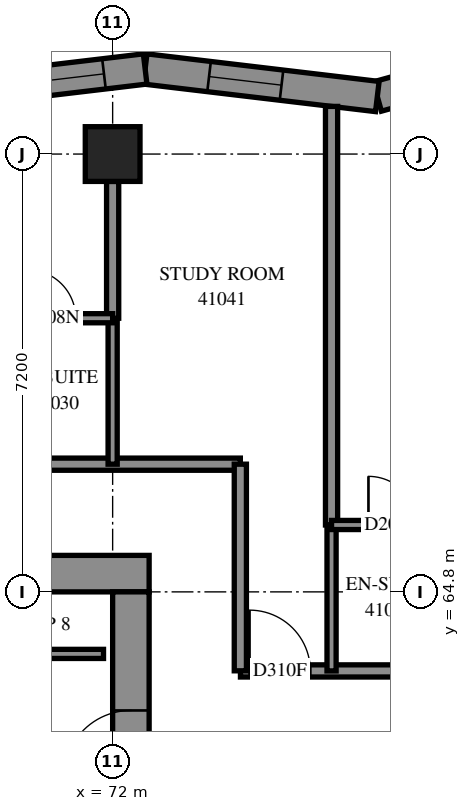
"""IFC4 building model, lengths in metres.
Left out: names, types, materials, properties, quantities, classifications, styles, units other than length and angle.
Written with IfcOpenShell. Run it as: python <this file> out.ifc"""

import sys

from ifc_helpers import new_model, si_unit, direction, frame, frame_2d, origin, origin_2d, place, context, subcontext, project, spatial, polyline, rectangle, outline, extrude, element, fill, save


model = new_model("IFC4")
c1 = context("Model", 3, precision=1e-05, world=origin(), true_north=direction((0.0, 1.0)))
c2 = subcontext(c1, "Body", "Model", "MODEL_VIEW")
j1 = project(units=[si_unit("LENGTHUNIT", "METRE"), si_unit("PLANEANGLEUNIT", "RADIAN")], contexts=[c1])
p1 = place(None, origin())
s1 = spatial("IfcSite", under=j1, at=p1, CompositionType="ELEMENT")
p2 = place(p1, origin())
s2 = spatial("IfcBuilding", under=s1, at=p2, CompositionType="ELEMENT")
p3 = place(p2, frame((0.0, 0.0, 152.4)))
s3 = spatial("IfcBuildingStorey", under=s2, at=p3, CompositionType="ELEMENT", Elevation=152.4)
p4 = place(p3, frame((72.0, 72.0, 0.0), z_axis=(0.0, 0.0, 1.0), x_axis=(1.0, 0.0, 0.0)))
e1 = element("IfcColumn", 1, at=p4, inside=s3, PredefinedType="COLUMN", context=c2, shape_type="SweptSolid", body=[
    extrude(rectangle(XDim=0.9, YDim=0.9, at=origin_2d()), origin(), (0.0, 0.0, 1.0), 3.1),
])
p5 = place(p3, frame((57.0, 65.1, -0.3), z_axis=(0.0, 0.0, 1.0), x_axis=(1.0, 0.0, 0.0)))
e2 = element("IfcWall", 2, at=p5, inside=s3, PredefinedType="SHEAR", context=c2, shape_type="SweptSolid", body=[
    extrude(rectangle(XDim=15.6, YDim=0.6, at=frame_2d((7.8, 0.0))), origin(), (0.0, 0.0, 1.0), 2.7),
])
p6 = place(p5, frame((10.6, 0.0, 0.3)))
e3 = element("IfcOpeningElement", 3, at=p6, cuts=e2, PredefinedType="OPENING", context=c2, shape_type="SweptSolid", body=[
    extrude(rectangle(XDim=0.8, YDim=2.1, at=frame_2d((0.4, 1.05))), frame((0.0, 0.31, 0.0), z_axis=(0.0, -1.0, 0.0), x_axis=(1.0, 0.0, 0.0)), (0.0, 0.0, 1.0), 0.62),
])
p7 = place(p3, frame((72.3, 50.4, -0.3), z_axis=(0.0, 0.0, 1.0), x_axis=(0.0, 1.0, 0.0)))
e4 = element("IfcWall", 4, at=p7, inside=s3, PredefinedType="SHEAR", context=c2, shape_type="SweptSolid", body=[
    extrude(rectangle(XDim=14.4, YDim=0.6, at=frame_2d((7.2, 0.0))), origin(), (0.0, 0.0, 1.0), 2.7),
])
p8 = place(p7, frame((4.55, 0.0, 0.3)))
e5 = element("IfcOpeningElement", 5, at=p8, cuts=e4, PredefinedType="OPENING", context=c2, shape_type="SweptSolid", body=[
    extrude(rectangle(XDim=1.1, YDim=2.1, at=frame_2d((0.55, 1.05))), frame((0.0, 0.31, 0.0), z_axis=(0.0, -1.0, 0.0), x_axis=(1.0, 0.0, 0.0)), (0.0, 0.0, 1.0), 0.62),
])
p9 = place(p7, frame((11.35, 0.0, 0.3)))
e6 = element("IfcOpeningElement", 6, at=p9, cuts=e4, PredefinedType="OPENING", context=c2, shape_type="SweptSolid", body=[
    extrude(rectangle(XDim=1.1, YDim=2.1, at=frame_2d((0.55, 1.05))), frame((0.0, 0.31, 0.0), z_axis=(0.0, -1.0, 0.0), x_axis=(1.0, 0.0, 0.0)), (0.0, 0.0, 1.0), 0.62),
])
p10 = place(p3, frame((80.005, 73.956, 0.0), z_axis=(0.0, 0.0, 1.0), x_axis=(-0.9638013092, -0.2666215226, 0.0)))
e7 = element("IfcWall", 7, at=p10, inside=s3, PredefinedType="SOLIDWALL", context=c2, shape_type="SweptSolid", body=[
    extrude(outline(polyline([(-0.202, -0.25), (3.74, -0.25), (3.838, 0.25), (0.202, 0.25), (-0.202, -0.25)])), origin(), (0.0, 0.0, 1.0), 3.1),
])
p11 = place(p10, frame((1.612, 0.0, 0.45)))
e8 = element("IfcOpeningElement", 8, at=p11, cuts=e7, PredefinedType="OPENING", context=c2, shape_type="SweptSolid", body=[
    extrude(rectangle(XDim=1.2, YDim=2.5, at=frame_2d((0.6, 1.25))), frame((0.0, 0.26, 0.0), z_axis=(0.0, -1.0, 0.0), x_axis=(1.0, 0.0, 0.0)), (0.0, 0.0, 1.0), 0.52),
])
p12 = place(p3, frame((76.353, 72.946, 0.0), z_axis=(0.0, 0.0, 1.0), x_axis=(-0.9930297168, 0.1178642505, 0.0)))
e9 = element("IfcWall", 9, at=p12, inside=s3, PredefinedType="SOLIDWALL", context=c2, shape_type="SweptSolid", body=[
    extrude(outline(polyline([(0.049, -0.25), (3.875, -0.25), (3.815, 0.25), (-0.049, 0.25), (0.049, -0.25)])), origin(), (0.0, 0.0, 1.0), 3.1),
])
p13 = place(p12, frame((1.587, 0.0, 0.45)))
e10 = element("IfcOpeningElement", 10, at=p13, cuts=e9, PredefinedType="OPENING", context=c2, shape_type="SweptSolid", body=[
    extrude(rectangle(XDim=1.2, YDim=2.5, at=frame_2d((0.6, 1.25))), frame((0.0, 0.26, 0.0), z_axis=(0.0, -1.0, 0.0), x_axis=(1.0, 0.0, 0.0)), (0.0, 0.0, 1.0), 0.52),
])
p14 = place(p3, frame((72.534, 73.399, 0.0), z_axis=(0.0, 0.0, 1.0), x_axis=(-0.9930269402, -0.1178876415, 0.0)))
e11 = element("IfcWall", 11, at=p14, inside=s3, PredefinedType="SOLIDWALL", context=c2, shape_type="SweptSolid", body=[
    extrude(outline(polyline([(-0.03, -0.25), (3.796, -0.25), (3.855, 0.25), (0.03, 0.25), (-0.03, -0.25)])), origin(), (0.0, 0.0, 1.0), 3.1),
])
p15 = place(p14, frame((0.682, 0.0, 0.45)))
e12 = element("IfcOpeningElement", 12, at=p15, cuts=e11, PredefinedType="OPENING", context=c2, shape_type="SweptSolid", body=[
    extrude(rectangle(XDim=2.8, YDim=2.5, at=frame_2d((1.4, 1.25))), frame((0.0, 0.26, 0.0), z_axis=(0.0, -1.0, 0.0), x_axis=(1.0, 0.0, 0.0)), (0.0, 0.0, 1.0), 0.52),
])
p16 = place(p3, frame((64.95, 63.78, 0.0), z_axis=(0.0, 0.0, 1.0), x_axis=(1.0, 0.0, 0.0)))
e13 = element("IfcWall", 13, at=p16, inside=s3, PredefinedType="PARTITIONING", context=c2, shape_type="SweptSolid", body=[
    extrude(rectangle(XDim=6.9, YDim=0.15, at=frame_2d((3.45, 0.0))), origin(), (0.0, 0.0, 1.0), 3.1),
])
p17 = place(p3, frame((55.5, 66.9, 0.0), z_axis=(0.0, 0.0, 1.0), x_axis=(1.0, 0.0, 0.0)))
e14 = element("IfcWall", 14, at=p17, inside=s3, PredefinedType="PARTITIONING", context=c2, shape_type="SweptSolid", body=[
    extrude(rectangle(XDim=18.6, YDim=0.2, at=frame_2d((9.3, 0.0))), origin(), (0.0, 0.0, 1.0), 3.1),
])
p18 = place(p17, frame((4.4, 0.0, 0.0)))
e15 = element("IfcOpeningElement", 15, at=p18, cuts=e14, PredefinedType="OPENING", context=c2, shape_type="SweptSolid", body=[
    extrude(rectangle(XDim=0.9, YDim=2.1, at=frame_2d((0.45, 1.05))), frame((0.0, 0.11, 0.0), z_axis=(0.0, -1.0, 0.0), x_axis=(1.0, 0.0, 0.0)), (0.0, 0.0, 1.0), 0.22),
])
p19 = place(p17, frame((6.1, 0.0, 0.0)))
e16 = element("IfcOpeningElement", 16, at=p19, cuts=e14, PredefinedType="OPENING", context=c2, shape_type="SweptSolid", body=[
    extrude(rectangle(XDim=0.9, YDim=2.1, at=frame_2d((0.45, 1.05))), frame((0.0, 0.11, 0.0), z_axis=(0.0, -1.0, 0.0), x_axis=(1.0, 0.0, 0.0)), (0.0, 0.0, 1.0), 0.22),
])
p20 = place(p17, frame((11.65, 0.0, 0.0)))
e17 = element("IfcOpeningElement", 17, at=p20, cuts=e14, PredefinedType="OPENING", context=c2, shape_type="SweptSolid", body=[
    extrude(rectangle(XDim=0.9, YDim=2.1, at=frame_2d((0.45, 1.05))), frame((0.0, 0.11, 0.0), z_axis=(0.0, -1.0, 0.0), x_axis=(1.0, 0.0, 0.0)), (0.0, 0.0, 1.0), 0.22),
])
p21 = place(p17, frame((13.3, 0.0, 0.0)))
e18 = element("IfcOpeningElement", 18, at=p21, cuts=e14, PredefinedType="OPENING", context=c2, shape_type="SweptSolid", body=[
    extrude(rectangle(XDim=0.9, YDim=2.1, at=frame_2d((0.45, 1.05))), frame((0.0, 0.11, 0.0), z_axis=(0.0, -1.0, 0.0), x_axis=(1.0, 0.0, 0.0)), (0.0, 0.0, 1.0), 0.22),
])
p22 = place(p3, frame((75.6, 65.9, 0.0), z_axis=(0.0, 0.0, 1.0), x_axis=(0.0, 1.0, 0.0)))
e19 = element("IfcWall", 19, at=p22, inside=s3, PredefinedType="PARTITIONING", context=c2, shape_type="SweptSolid", body=[
    extrude(rectangle(XDim=6.884, YDim=0.2, at=frame_2d((3.442, 0.0))), origin(), (0.0, 0.0, 1.0), 3.1),
])
p23 = place(p3, frame((74.102, 63.5, 0.0), z_axis=(0.0, 0.0, 1.0), x_axis=(1.0, 0.0, 0.0)))
e20 = element("IfcWall", 20, at=p23, inside=s3, PredefinedType="PARTITIONING", context=c2, shape_type="SweptSolid", body=[
    extrude(rectangle(XDim=5.098, YDim=0.2, at=frame_2d((2.549, 0.0))), origin(), (0.0, 0.0, 1.0), 3.1),
])
p24 = place(p23, frame((0.149, 0.0, 0.0)))
e21 = element("IfcOpeningElement", 21, at=p24, cuts=e20, PredefinedType="OPENING", context=c2, shape_type="SweptSolid", body=[
    extrude(rectangle(XDim=1.0, YDim=2.1, at=frame_2d((0.5, 1.05))), frame((0.0, 0.11, 0.0), z_axis=(0.0, -1.0, 0.0), x_axis=(1.0, 0.0, 0.0)), (0.0, 0.0, 1.0), 0.22),
])
p25 = place(p23, frame((3.688, 0.0, 0.0)))
e22 = element("IfcOpeningElement", 22, at=p25, cuts=e20, PredefinedType="OPENING", context=c2, shape_type="SweptSolid", body=[
    extrude(rectangle(XDim=0.9, YDim=2.1, at=frame_2d((0.45, 1.05))), frame((0.0, 0.11, 0.0), z_axis=(0.0, -1.0, 0.0), x_axis=(1.0, 0.0, 0.0)), (0.0, 0.0, 1.0), 0.22),
])
p26 = place(p3, frame((74.1, 63.502, 0.0), z_axis=(0.0, 0.0, 1.0), x_axis=(0.0, 1.0, 0.0)))
e23 = element("IfcWall", 23, at=p26, inside=s3, PredefinedType="PARTITIONING", context=c2, shape_type="SweptSolid", body=[
    extrude(rectangle(XDim=3.398, YDim=0.2, at=frame_2d((1.699, 0.0))), origin(), (0.0, 0.0, 1.0), 3.1),
])
for number, where, z_axis, x_axis in (
    (24, (75.6, 63.5, 0.0), (0.0, 0.0, 1.0), (0.0, 1.0, 0.0)),
    (25, (72.0, 66.9, 0.0), (0.0, 0.0, 1.0), (0.0, 1.0, 0.0)),
):
    element("IfcWall", number, at=place(p3, frame(where, z_axis=z_axis, x_axis=x_axis)), inside=s3, PredefinedType="PARTITIONING", context=c2, shape_type="SweptSolid", body=[
        extrude(rectangle(XDim=2.4, YDim=0.15, at=frame_2d((1.2, 0.0))), origin(), (0.0, 0.0, 1.0), 3.1),
    ])
p27 = place(p3, frame((72.0, 69.3, 0.0), z_axis=(0.0, 0.0, 1.0), x_axis=(0.0, 1.0, 0.0)))
e26 = element("IfcWall", 26, at=p27, inside=s3, PredefinedType="PARTITIONING", context=c2, shape_type="SweptSolid", body=[
    extrude(rectangle(XDim=2.25, YDim=0.2, at=frame_2d((1.125, 0.0))), origin(), (0.0, 0.0, 1.0), 3.1),
])
p28 = place(p3, frame((75.6, 65.9, 0.0), z_axis=(0.0, 0.0, 1.0), x_axis=(1.0, 0.0, 0.0)))
e27 = element("IfcWall", 27, at=p28, inside=s3, PredefinedType="PARTITIONING", context=c2, shape_type="SweptSolid", body=[
    extrude(rectangle(XDim=1.9, YDim=0.15, at=frame_2d((0.95, 0.0))), origin(), (0.0, 0.0, 1.0), 3.1),
])
p29 = place(p28, frame((0.607, 0.0, 0.0)))
e28 = element("IfcOpeningElement", 28, at=p29, cuts=e27, PredefinedType="OPENING", context=c2, shape_type="SweptSolid", body=[
    extrude(rectangle(XDim=0.8, YDim=2.1, at=frame_2d((0.4, 1.05))), frame((0.0, 0.085, 0.0), z_axis=(0.0, -1.0, 0.0), x_axis=(1.0, 0.0, 0.0)), (0.0, 0.0, 1.0), 0.17),
])
p30 = place(p3, frame((70.1, 69.3, 0.0), z_axis=(0.0, 0.0, 1.0), x_axis=(1.0, 0.0, 0.0)))
e29 = element("IfcWall", 29, at=p30, inside=s3, PredefinedType="PARTITIONING", context=c2, shape_type="SweptSolid", body=[
    extrude(rectangle(XDim=1.9, YDim=0.15, at=frame_2d((0.95, 0.0))), origin(), (0.0, 0.0, 1.0), 3.1),
])
p31 = place(p30, frame((0.493, 0.0, 0.0)))
e30 = element("IfcOpeningElement", 30, at=p31, cuts=e29, PredefinedType="OPENING", context=c2, shape_type="SweptSolid", body=[
    extrude(rectangle(XDim=0.8, YDim=2.1, at=frame_2d((0.4, 1.05))), frame((0.0, 0.085, 0.0), z_axis=(0.0, -1.0, 0.0), x_axis=(1.0, 0.0, 0.0)), (0.0, 0.0, 1.0), 0.17),
])
p32 = place(p13, origin())
e31 = element("IfcWindow", 31, at=p32, inside=s3, PartitioningType="SINGLE_PANEL", PredefinedType="WINDOW", context=c2, shape_type="SweptSolid", body=[
    extrude(rectangle(XDim=1.2, YDim=2.5, at=frame_2d((0.6, 1.25))), frame((0.0, 0.18, 0.0), z_axis=(0.0, -1.0, 0.0), x_axis=(1.0, 0.0, 0.0)), (0.0, 0.0, 1.0), 0.06),
])
fill(e10, e31)
p33 = place(p15, origin())
e32 = element("IfcWindow", 32, at=p33, inside=s3, PartitioningType="SINGLE_PANEL", PredefinedType="WINDOW", context=c2, shape_type="SweptSolid", body=[
    extrude(rectangle(XDim=2.8, YDim=2.5, at=frame_2d((1.4, 1.25))), frame((0.0, 0.18, 0.0), z_axis=(0.0, -1.0, 0.0), x_axis=(1.0, 0.0, 0.0)), (0.0, 0.0, 1.0), 0.06),
])
fill(e12, e32)
p34 = place(p9, origin())
e33 = element("IfcDoor", 33, at=p34, inside=s3, OperationType="SINGLE_SWING_RIGHT", PredefinedType="DOOR", context=c2, shape_type="SweptSolid", body=[
    extrude(rectangle(XDim=1.1, YDim=2.1, at=frame_2d((0.55, 1.05))), frame((0.0, 0.025, 0.0), z_axis=(0.0, -1.0, 0.0), x_axis=(1.0, 0.0, 0.0)), (0.0, 0.0, 1.0), 0.05),
])
fill(e6, e33)
p35 = place(p31, origin())
e34 = element("IfcDoor", 34, at=p35, inside=s3, OperationType="SINGLE_SWING_RIGHT", PredefinedType="DOOR", context=c2, shape_type="SweptSolid", body=[
    extrude(rectangle(XDim=0.8, YDim=2.1, at=frame_2d((0.4, 1.05))), frame((0.0, 0.025, 0.0), z_axis=(0.0, -1.0, 0.0), x_axis=(1.0, 0.0, 0.0)), (0.0, 0.0, 1.0), 0.05),
])
fill(e30, e34)
p36 = place(p24, origin())
e35 = element("IfcDoor", 35, at=p36, inside=s3, OperationType="SINGLE_SWING_RIGHT", PredefinedType="DOOR", context=c2, shape_type="SweptSolid", body=[
    extrude(rectangle(XDim=1.0, YDim=2.1, at=frame_2d((0.5, 1.05))), frame((0.0, 0.025, 0.0), z_axis=(0.0, -1.0, 0.0), x_axis=(1.0, 0.0, 0.0)), (0.0, 0.0, 1.0), 0.05),
])
fill(e21, e35)
p37 = place(p29, origin())
e36 = element("IfcDoor", 36, at=p37, inside=s3, OperationType="SINGLE_SWING_RIGHT", PredefinedType="DOOR", context=c2, shape_type="SweptSolid", body=[
    extrude(rectangle(XDim=0.8, YDim=2.1, at=frame_2d((0.4, 1.05))), frame((0.0, 0.025, 0.0), z_axis=(0.0, -1.0, 0.0), x_axis=(1.0, 0.0, 0.0)), (0.0, 0.0, 1.0), 0.05),
])
fill(e28, e36)
save(model, sys.argv[1])
